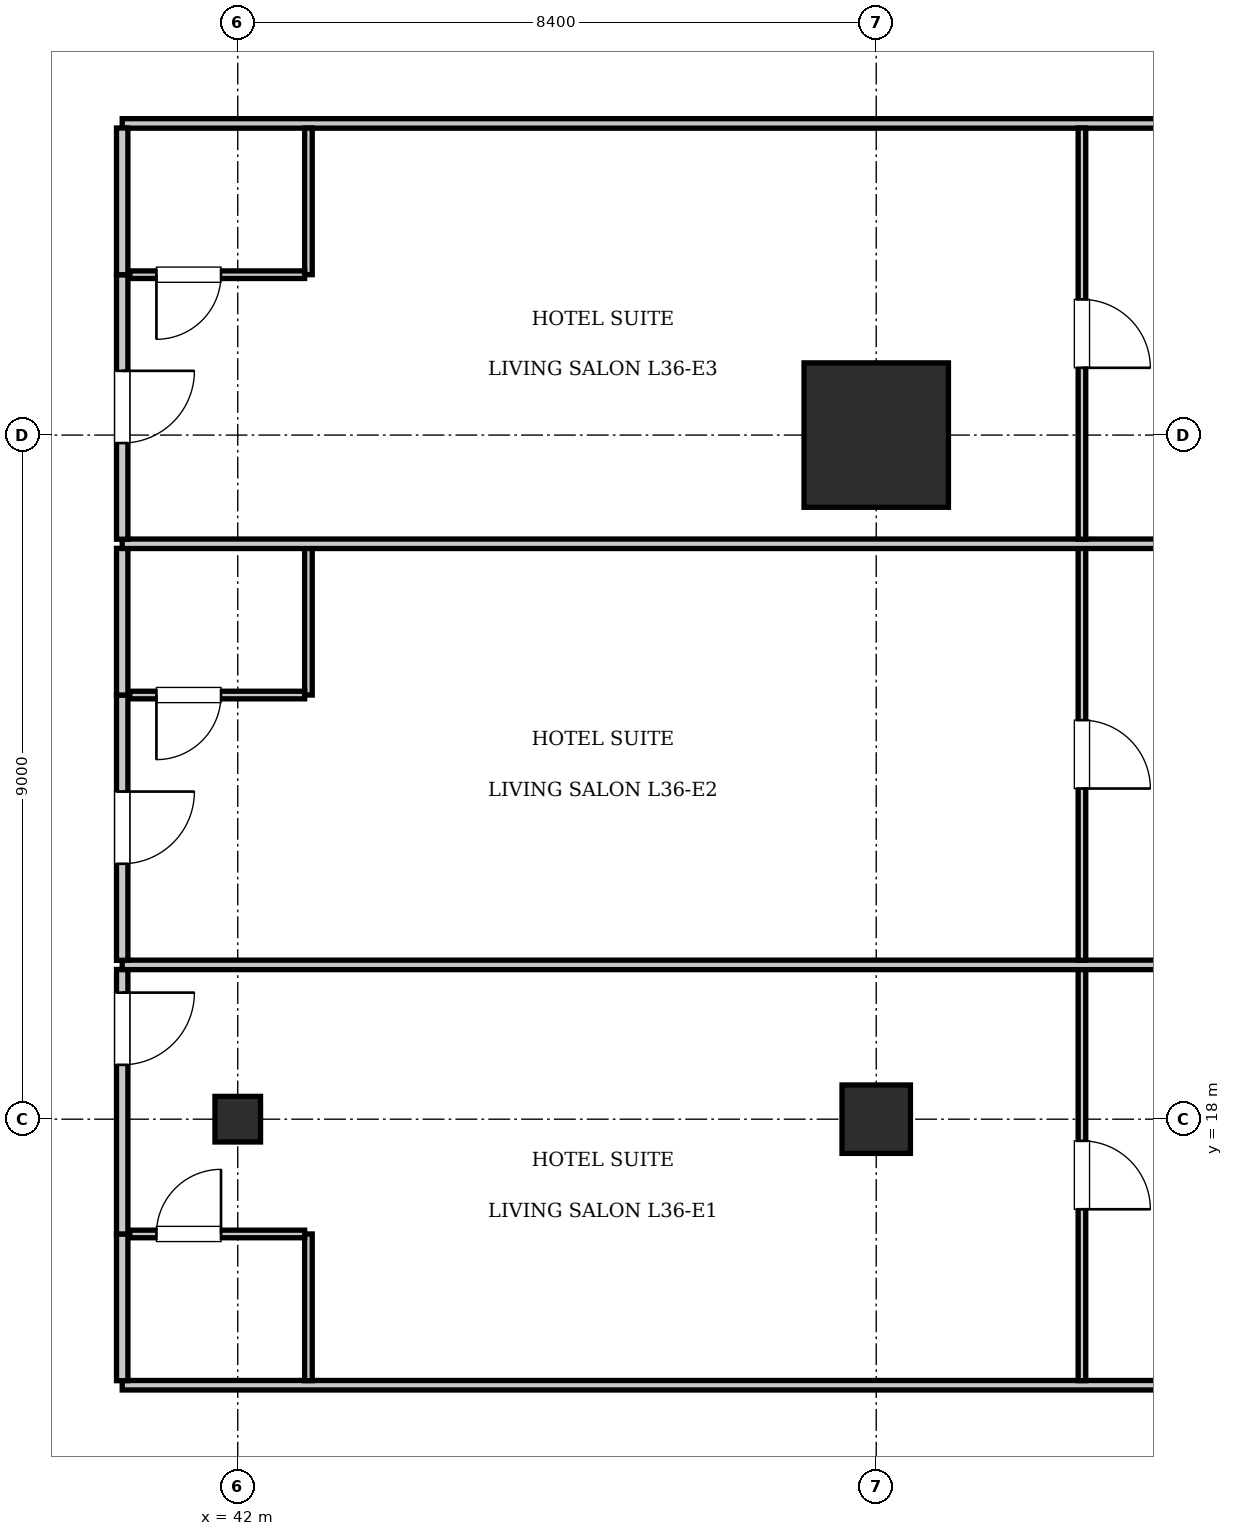
"""IFC4 building model, lengths in metres.
Left out: names, types, materials, properties, quantities, classifications, styles, units other than length and angle.
Written with IfcOpenShell. Run it as: python <this file> out.ifc"""

import sys

from ifc_helpers import new_model, si_unit, direction, frame, frame_2d, origin, origin_2d, place, context, subcontext, project, spatial, rectangle, i_section, extrude, element, fill, save


model = new_model("IFC4")
c1 = context("Model", 3, precision=1e-05, world=origin(), true_north=direction((0.0, 1.0)))
c2 = subcontext(c1, "Body", "Model", "MODEL_VIEW")
j1 = project(units=[si_unit("LENGTHUNIT", "METRE"), si_unit("PLANEANGLEUNIT", "RADIAN")], contexts=[c1])
p1 = place(None, origin())
s1 = spatial("IfcSite", under=j1, at=p1, CompositionType="ELEMENT")
p2 = place(p1, origin())
s2 = spatial("IfcBuilding", under=s1, at=p2, CompositionType="ELEMENT")
p3 = place(p2, frame((0.0, 0.0, 150.5)))
s3 = spatial("IfcBuildingStorey", under=s2, at=p3, CompositionType="ELEMENT", Elevation=150.5)
p4 = place(p3, frame((50.4, 27.0, 0.0), z_axis=(0.0, 0.0, 1.0), x_axis=(1.0, 0.0, 0.0)))
e1 = element("IfcColumn", 1, at=p4, inside=s3, PredefinedType="COLUMN", context=c2, shape_type="SweptSolid", body=[
    extrude(rectangle(XDim=1.9, YDim=1.9, at=origin_2d()), origin(), (0.0, 0.0, 1.0), 3.85),
])
p5 = place(p3, frame((50.4, 18.0, 0.0), z_axis=(0.0, 0.0, 1.0), x_axis=(1.0, 0.0, 0.0)))
e2 = element("IfcColumn", 2, at=p5, inside=s3, PredefinedType="COLUMN", context=c2, shape_type="SweptSolid", body=[
    extrude(rectangle(XDim=0.9, YDim=0.9, at=origin_2d()), origin(), (0.0, 0.0, 1.0), 3.85),
])
p6 = place(p3, frame((42.0, 18.0, 0.0), z_axis=(0.0, 0.0, 1.0), x_axis=(1.0, 0.0, 0.0)))
e3 = element("IfcColumn", 3, at=p6, inside=s3, PredefinedType="COLUMN", context=c2, shape_type="SweptSolid", body=[
    extrude(i_section(OverallWidth=0.6, OverallDepth=0.6, WebThickness=0.025, FlangeThickness=0.038, at=origin_2d()), origin(), (0.0, 0.0, 1.0), 3.85),
])
for number, where, z_axis, x_axis in (
    (4, (40.48, 14.5, 0.0), (0.0, 0.0, 1.0), (1.0, 0.0, 0.0)),
    (5, (40.48, 31.1, 0.0), (0.0, 0.0, 1.0), (1.0, 0.0, 0.0)),
):
    element("IfcWall", number, at=place(p3, frame(where, z_axis=z_axis, x_axis=x_axis)), inside=s3, PredefinedType="PARTITIONING", context=c2, shape_type="SweptSolid", body=[
        extrude(rectangle(XDim=21.92, YDim=0.125, at=frame_2d((10.96, 0.0))), origin(), (0.0, 0.0, 1.0), 3.61),
    ])
p7 = place(p3, frame((40.48, 14.56, 0.0), z_axis=(0.0, 0.0, 1.0), x_axis=(0.0, 1.0, 0.0)))
e6 = element("IfcWall", 6, at=p7, inside=s3, PredefinedType="PARTITIONING", context=c2, shape_type="SweptSolid", body=[
    extrude(rectangle(XDim=1.93, YDim=0.15, at=frame_2d((0.965, 0.0))), origin(), (0.0, 0.0, 1.0), 3.61),
])
p8 = place(p3, frame((40.48, 16.49, 0.0), z_axis=(0.0, 0.0, 1.0), x_axis=(0.0, 1.0, 0.0)))
e7 = element("IfcWall", 7, at=p8, inside=s3, PredefinedType="PARTITIONING", context=c2, shape_type="SweptSolid", body=[
    extrude(rectangle(XDim=3.48, YDim=0.15, at=frame_2d((1.74, 0.0))), origin(), (0.0, 0.0, 1.0), 3.61),
])
p9 = place(p8, frame((2.225, 0.0, 0.0)))
e8 = element("IfcOpeningElement", 8, at=p9, cuts=e7, PredefinedType="OPENING", context=c2, shape_type="SweptSolid", body=[
    extrude(rectangle(XDim=0.95, YDim=2.15, at=frame_2d((0.475, 1.075))), frame((0.0, 0.085, 0.0), z_axis=(0.0, -1.0, 0.0), x_axis=(1.0, 0.0, 0.0)), (0.0, 0.0, 1.0), 0.17),
])
p10 = place(p3, frame((42.93, 14.56, 0.0), z_axis=(0.0, 0.0, 1.0), x_axis=(0.0, 1.0, 0.0)))
e9 = element("IfcWall", 9, at=p10, inside=s3, PredefinedType="PARTITIONING", context=c2, shape_type="SweptSolid", body=[
    extrude(rectangle(XDim=1.93, YDim=0.1, at=frame_2d((0.965, 0.0))), origin(), (0.0, 0.0, 1.0), 3.61),
])
p11 = place(p3, frame((40.58, 16.49, 0.0), z_axis=(0.0, 0.0, 1.0), x_axis=(1.0, 0.0, 0.0)))
e10 = element("IfcWall", 10, at=p11, inside=s3, PredefinedType="PARTITIONING", context=c2, shape_type="SweptSolid", body=[
    extrude(rectangle(XDim=2.3, YDim=0.1, at=frame_2d((1.15, 0.0))), origin(), (0.0, 0.0, 1.0), 3.61),
])
p12 = place(p11, frame((0.35, 0.0, 0.0)))
e11 = element("IfcOpeningElement", 11, at=p12, cuts=e10, PredefinedType="OPENING", context=c2, shape_type="SweptSolid", body=[
    extrude(rectangle(XDim=0.85, YDim=2.1, at=frame_2d((0.425, 1.05))), frame((0.0, 0.06, 0.0), z_axis=(0.0, -1.0, 0.0), x_axis=(1.0, 0.0, 0.0)), (0.0, 0.0, 1.0), 0.12),
])
p13 = place(p3, frame((53.106, 14.56, 0.0), z_axis=(0.0, 0.0, 1.0), x_axis=(0.0, 1.0, 0.0)))
e12 = element("IfcWall", 12, at=p13, inside=s3, PredefinedType="PARTITIONING", context=c2, shape_type="SweptSolid", body=[
    extrude(rectangle(XDim=5.41, YDim=0.1, at=frame_2d((2.705, 0.0))), origin(), (0.0, 0.0, 1.0), 3.61),
])
p14 = place(p13, frame((2.255, 0.0, 0.0)))
e13 = element("IfcOpeningElement", 13, at=p14, cuts=e12, PredefinedType="OPENING", context=c2, shape_type="SweptSolid", body=[
    extrude(rectangle(XDim=0.9, YDim=2.1, at=frame_2d((0.45, 1.05))), frame((0.0, 0.06, 0.0), z_axis=(0.0, -1.0, 0.0), x_axis=(1.0, 0.0, 0.0)), (0.0, 0.0, 1.0), 0.12),
])
p15 = place(p3, frame((40.48, 20.03, 0.0), z_axis=(0.0, 0.0, 1.0), x_axis=(1.0, 0.0, 0.0)))
e14 = element("IfcWall", 14, at=p15, inside=s3, PredefinedType="PARTITIONING", context=c2, shape_type="SweptSolid", body=[
    extrude(rectangle(XDim=21.92, YDim=0.125, at=frame_2d((10.96, 0.0))), origin(), (0.0, 0.0, 1.0), 3.61),
])
p16 = place(p3, frame((40.48, 20.09, 0.0), z_axis=(0.0, 0.0, 1.0), x_axis=(0.0, 1.0, 0.0)))
e15 = element("IfcWall", 15, at=p16, inside=s3, PredefinedType="PARTITIONING", context=c2, shape_type="SweptSolid", body=[
    extrude(rectangle(XDim=3.49, YDim=0.15, at=frame_2d((1.745, 0.0))), origin(), (0.0, 0.0, 1.0), 3.61),
])
p17 = place(p16, frame((1.27, 0.0, 0.0)))
e16 = element("IfcOpeningElement", 16, at=p17, cuts=e15, PredefinedType="OPENING", context=c2, shape_type="SweptSolid", body=[
    extrude(rectangle(XDim=0.95, YDim=2.15, at=frame_2d((0.475, 1.075))), frame((0.0, 0.085, 0.0), z_axis=(0.0, -1.0, 0.0), x_axis=(1.0, 0.0, 0.0)), (0.0, 0.0, 1.0), 0.17),
])
p18 = place(p3, frame((40.48, 23.58, 0.0), z_axis=(0.0, 0.0, 1.0), x_axis=(0.0, 1.0, 0.0)))
e17 = element("IfcWall", 17, at=p18, inside=s3, PredefinedType="PARTITIONING", context=c2, shape_type="SweptSolid", body=[
    extrude(rectangle(XDim=1.93, YDim=0.15, at=frame_2d((0.965, 0.0))), origin(), (0.0, 0.0, 1.0), 3.61),
])
p19 = place(p3, frame((42.93, 23.58, 0.0), z_axis=(0.0, 0.0, 1.0), x_axis=(0.0, 1.0, 0.0)))
e18 = element("IfcWall", 18, at=p19, inside=s3, PredefinedType="PARTITIONING", context=c2, shape_type="SweptSolid", body=[
    extrude(rectangle(XDim=1.93, YDim=0.1, at=frame_2d((0.965, 0.0))), origin(), (0.0, 0.0, 1.0), 3.61),
])
p20 = place(p3, frame((40.58, 23.58, 0.0), z_axis=(0.0, 0.0, 1.0), x_axis=(1.0, 0.0, 0.0)))
e19 = element("IfcWall", 19, at=p20, inside=s3, PredefinedType="PARTITIONING", context=c2, shape_type="SweptSolid", body=[
    extrude(rectangle(XDim=2.3, YDim=0.1, at=frame_2d((1.15, 0.0))), origin(), (0.0, 0.0, 1.0), 3.61),
])
p21 = place(p20, frame((0.35, 0.0, 0.0)))
e20 = element("IfcOpeningElement", 20, at=p21, cuts=e19, PredefinedType="OPENING", context=c2, shape_type="SweptSolid", body=[
    extrude(rectangle(XDim=0.85, YDim=2.1, at=frame_2d((0.425, 1.05))), frame((0.0, 0.06, 0.0), z_axis=(0.0, -1.0, 0.0), x_axis=(1.0, 0.0, 0.0)), (0.0, 0.0, 1.0), 0.12),
])
p22 = place(p3, frame((53.106, 20.09, 0.0), z_axis=(0.0, 0.0, 1.0), x_axis=(0.0, 1.0, 0.0)))
e21 = element("IfcWall", 21, at=p22, inside=s3, PredefinedType="PARTITIONING", context=c2, shape_type="SweptSolid", body=[
    extrude(rectangle(XDim=5.42, YDim=0.1, at=frame_2d((2.71, 0.0))), origin(), (0.0, 0.0, 1.0), 3.61),
])
p23 = place(p22, frame((2.26, 0.0, 0.0)))
e22 = element("IfcOpeningElement", 22, at=p23, cuts=e21, PredefinedType="OPENING", context=c2, shape_type="SweptSolid", body=[
    extrude(rectangle(XDim=0.9, YDim=2.1, at=frame_2d((0.45, 1.05))), frame((0.0, 0.06, 0.0), z_axis=(0.0, -1.0, 0.0), x_axis=(1.0, 0.0, 0.0)), (0.0, 0.0, 1.0), 0.12),
])
p24 = place(p3, frame((40.48, 25.57, 0.0), z_axis=(0.0, 0.0, 1.0), x_axis=(1.0, 0.0, 0.0)))
e23 = element("IfcWall", 23, at=p24, inside=s3, PredefinedType="PARTITIONING", context=c2, shape_type="SweptSolid", body=[
    extrude(rectangle(XDim=21.92, YDim=0.125, at=frame_2d((10.96, 0.0))), origin(), (0.0, 0.0, 1.0), 3.61),
])
p25 = place(p3, frame((40.48, 25.63, 0.0), z_axis=(0.0, 0.0, 1.0), x_axis=(0.0, 1.0, 0.0)))
e24 = element("IfcWall", 24, at=p25, inside=s3, PredefinedType="PARTITIONING", context=c2, shape_type="SweptSolid", body=[
    extrude(rectangle(XDim=3.48, YDim=0.15, at=frame_2d((1.74, 0.0))), origin(), (0.0, 0.0, 1.0), 3.61),
])
p26 = place(p25, frame((1.265, 0.0, 0.0)))
e25 = element("IfcOpeningElement", 25, at=p26, cuts=e24, PredefinedType="OPENING", context=c2, shape_type="SweptSolid", body=[
    extrude(rectangle(XDim=0.95, YDim=2.15, at=frame_2d((0.475, 1.075))), frame((0.0, 0.085, 0.0), z_axis=(0.0, -1.0, 0.0), x_axis=(1.0, 0.0, 0.0)), (0.0, 0.0, 1.0), 0.17),
])
p27 = place(p3, frame((40.48, 29.11, 0.0), z_axis=(0.0, 0.0, 1.0), x_axis=(0.0, 1.0, 0.0)))
e26 = element("IfcWall", 26, at=p27, inside=s3, PredefinedType="PARTITIONING", context=c2, shape_type="SweptSolid", body=[
    extrude(rectangle(XDim=1.93, YDim=0.15, at=frame_2d((0.965, 0.0))), origin(), (0.0, 0.0, 1.0), 3.61),
])
p28 = place(p3, frame((42.93, 29.11, 0.0), z_axis=(0.0, 0.0, 1.0), x_axis=(0.0, 1.0, 0.0)))
e27 = element("IfcWall", 27, at=p28, inside=s3, PredefinedType="PARTITIONING", context=c2, shape_type="SweptSolid", body=[
    extrude(rectangle(XDim=1.93, YDim=0.1, at=frame_2d((0.965, 0.0))), origin(), (0.0, 0.0, 1.0), 3.61),
])
p29 = place(p3, frame((40.58, 29.11, 0.0), z_axis=(0.0, 0.0, 1.0), x_axis=(1.0, 0.0, 0.0)))
e28 = element("IfcWall", 28, at=p29, inside=s3, PredefinedType="PARTITIONING", context=c2, shape_type="SweptSolid", body=[
    extrude(rectangle(XDim=2.3, YDim=0.1, at=frame_2d((1.15, 0.0))), origin(), (0.0, 0.0, 1.0), 3.61),
])
p30 = place(p29, frame((0.35, 0.0, 0.0)))
e29 = element("IfcOpeningElement", 29, at=p30, cuts=e28, PredefinedType="OPENING", context=c2, shape_type="SweptSolid", body=[
    extrude(rectangle(XDim=0.85, YDim=2.1, at=frame_2d((0.425, 1.05))), frame((0.0, 0.06, 0.0), z_axis=(0.0, -1.0, 0.0), x_axis=(1.0, 0.0, 0.0)), (0.0, 0.0, 1.0), 0.12),
])
p31 = place(p3, frame((53.106, 25.63, 0.0), z_axis=(0.0, 0.0, 1.0), x_axis=(0.0, 1.0, 0.0)))
e30 = element("IfcWall", 30, at=p31, inside=s3, PredefinedType="PARTITIONING", context=c2, shape_type="SweptSolid", body=[
    extrude(rectangle(XDim=5.41, YDim=0.1, at=frame_2d((2.705, 0.0))), origin(), (0.0, 0.0, 1.0), 3.61),
])
p32 = place(p31, frame((2.255, 0.0, 0.0)))
e31 = element("IfcOpeningElement", 31, at=p32, cuts=e30, PredefinedType="OPENING", context=c2, shape_type="SweptSolid", body=[
    extrude(rectangle(XDim=0.9, YDim=2.1, at=frame_2d((0.45, 1.05))), frame((0.0, 0.06, 0.0), z_axis=(0.0, -1.0, 0.0), x_axis=(1.0, 0.0, 0.0)), (0.0, 0.0, 1.0), 0.12),
])
p33 = place(p12, origin())
e32 = element("IfcDoor", 32, at=p33, inside=s3, OperationType="SINGLE_SWING_RIGHT", PredefinedType="DOOR", context=c2, shape_type="SweptSolid", body=[
    extrude(rectangle(XDim=0.85, YDim=2.1, at=frame_2d((0.425, 1.05))), frame((0.0, 0.025, 0.0), z_axis=(0.0, -1.0, 0.0), x_axis=(1.0, 0.0, 0.0)), (0.0, 0.0, 1.0), 0.05),
])
fill(e11, e32)
p34 = place(p9, frame((0.95, 0.0, 0.0), z_axis=(0.0, 0.0, 1.0), x_axis=(-1.0, 0.0, 0.0)))
e33 = element("IfcDoor", 33, at=p34, inside=s3, OperationType="SINGLE_SWING_LEFT", PredefinedType="DOOR", context=c2, shape_type="SweptSolid", body=[
    extrude(rectangle(XDim=0.95, YDim=2.15, at=frame_2d((0.475, 1.075))), frame((0.0, 0.025, 0.0), z_axis=(0.0, -1.0, 0.0), x_axis=(1.0, 0.0, 0.0)), (0.0, 0.0, 1.0), 0.05),
])
fill(e8, e33)
p35 = place(p14, frame((0.9, 0.0, 0.0), z_axis=(0.0, 0.0, 1.0), x_axis=(-1.0, 0.0, 0.0)))
e34 = element("IfcDoor", 34, at=p35, inside=s3, OperationType="SINGLE_SWING_RIGHT", PredefinedType="DOOR", context=c2, shape_type="SweptSolid", body=[
    extrude(rectangle(XDim=0.9, YDim=2.1, at=frame_2d((0.45, 1.05))), frame((0.0, 0.025, 0.0), z_axis=(0.0, -1.0, 0.0), x_axis=(1.0, 0.0, 0.0)), (0.0, 0.0, 1.0), 0.05),
])
fill(e13, e34)
p36 = place(p21, frame((0.85, 0.0, 0.0), z_axis=(0.0, 0.0, 1.0), x_axis=(-1.0, 0.0, 0.0)))
e35 = element("IfcDoor", 35, at=p36, inside=s3, OperationType="SINGLE_SWING_RIGHT", PredefinedType="DOOR", context=c2, shape_type="SweptSolid", body=[
    extrude(rectangle(XDim=0.85, YDim=2.1, at=frame_2d((0.425, 1.05))), frame((0.0, 0.025, 0.0), z_axis=(0.0, -1.0, 0.0), x_axis=(1.0, 0.0, 0.0)), (0.0, 0.0, 1.0), 0.05),
])
fill(e20, e35)
p37 = place(p17, frame((0.95, 0.0, 0.0), z_axis=(0.0, 0.0, 1.0), x_axis=(-1.0, 0.0, 0.0)))
e36 = element("IfcDoor", 36, at=p37, inside=s3, OperationType="SINGLE_SWING_LEFT", PredefinedType="DOOR", context=c2, shape_type="SweptSolid", body=[
    extrude(rectangle(XDim=0.95, YDim=2.15, at=frame_2d((0.475, 1.075))), frame((0.0, 0.025, 0.0), z_axis=(0.0, -1.0, 0.0), x_axis=(1.0, 0.0, 0.0)), (0.0, 0.0, 1.0), 0.05),
])
fill(e16, e36)
p38 = place(p23, frame((0.9, 0.0, 0.0), z_axis=(0.0, 0.0, 1.0), x_axis=(-1.0, 0.0, 0.0)))
e37 = element("IfcDoor", 37, at=p38, inside=s3, OperationType="SINGLE_SWING_RIGHT", PredefinedType="DOOR", context=c2, shape_type="SweptSolid", body=[
    extrude(rectangle(XDim=0.9, YDim=2.1, at=frame_2d((0.45, 1.05))), frame((0.0, 0.025, 0.0), z_axis=(0.0, -1.0, 0.0), x_axis=(1.0, 0.0, 0.0)), (0.0, 0.0, 1.0), 0.05),
])
fill(e22, e37)
p39 = place(p30, frame((0.85, 0.0, 0.0), z_axis=(0.0, 0.0, 1.0), x_axis=(-1.0, 0.0, 0.0)))
e38 = element("IfcDoor", 38, at=p39, inside=s3, OperationType="SINGLE_SWING_RIGHT", PredefinedType="DOOR", context=c2, shape_type="SweptSolid", body=[
    extrude(rectangle(XDim=0.85, YDim=2.1, at=frame_2d((0.425, 1.05))), frame((0.0, 0.025, 0.0), z_axis=(0.0, -1.0, 0.0), x_axis=(1.0, 0.0, 0.0)), (0.0, 0.0, 1.0), 0.05),
])
fill(e29, e38)
p40 = place(p26, frame((0.95, 0.0, 0.0), z_axis=(0.0, 0.0, 1.0), x_axis=(-1.0, 0.0, 0.0)))
e39 = element("IfcDoor", 39, at=p40, inside=s3, OperationType="SINGLE_SWING_LEFT", PredefinedType="DOOR", context=c2, shape_type="SweptSolid", body=[
    extrude(rectangle(XDim=0.95, YDim=2.15, at=frame_2d((0.475, 1.075))), frame((0.0, 0.025, 0.0), z_axis=(0.0, -1.0, 0.0), x_axis=(1.0, 0.0, 0.0)), (0.0, 0.0, 1.0), 0.05),
])
fill(e25, e39)
p41 = place(p32, frame((0.9, 0.0, 0.0), z_axis=(0.0, 0.0, 1.0), x_axis=(-1.0, 0.0, 0.0)))
e40 = element("IfcDoor", 40, at=p41, inside=s3, OperationType="SINGLE_SWING_RIGHT", PredefinedType="DOOR", context=c2, shape_type="SweptSolid", body=[
    extrude(rectangle(XDim=0.9, YDim=2.1, at=frame_2d((0.45, 1.05))), frame((0.0, 0.025, 0.0), z_axis=(0.0, -1.0, 0.0), x_axis=(1.0, 0.0, 0.0)), (0.0, 0.0, 1.0), 0.05),
])
fill(e31, e40)
save(model, sys.argv[1])
